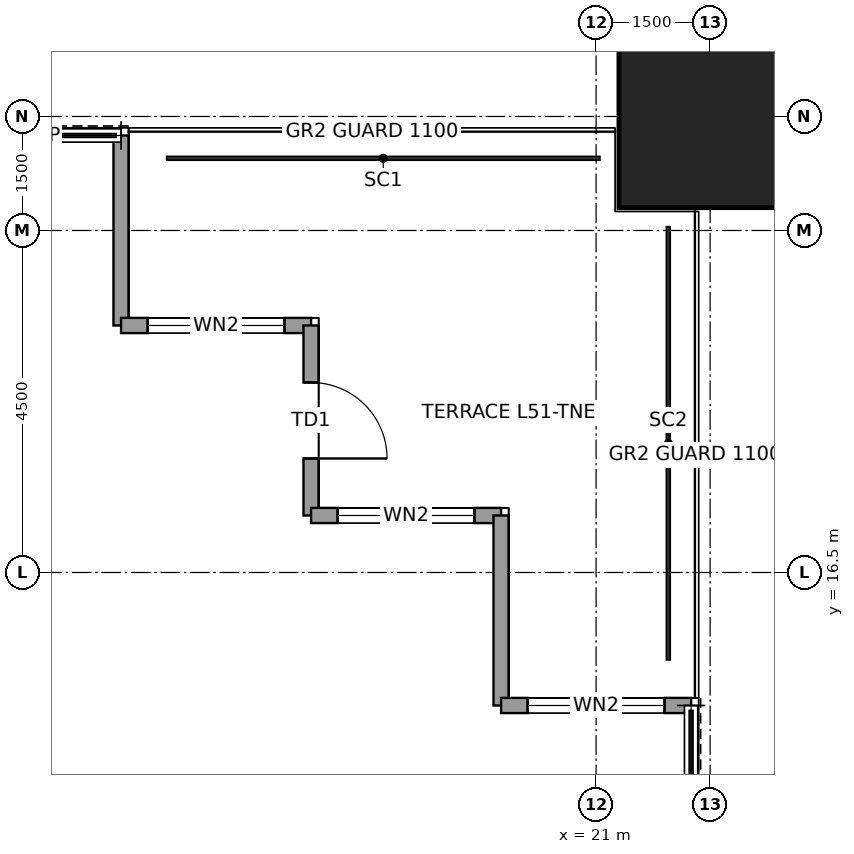
"""IFC4 building model, lengths in metres.
Left out: names, types, materials, properties, quantities, classifications, styles, units other than length and angle.
Written with IfcOpenShell. Run it as: python <this file> out.ifc"""

import sys

from ifc_helpers import new_model, si_unit, direction, frame, frame_2d, origin, origin_2d, place, context, subcontext, project, spatial, rectangle, hollow_rectangle, extrude, element, fill, save


model = new_model("IFC4")
c1 = context("Model", 3, precision=1e-05, world=origin(), true_north=direction((0.0, 1.0)))
c2 = subcontext(c1, "Body", "Model", "MODEL_VIEW")
j1 = project(units=[si_unit("LENGTHUNIT", "METRE"), si_unit("PLANEANGLEUNIT", "RADIAN")], contexts=[c1])
p1 = place(None, origin())
s1 = spatial("IfcSite", under=j1, at=p1, CompositionType="ELEMENT")
p2 = place(p1, origin())
s2 = spatial("IfcBuilding", under=s1, at=p2, CompositionType="ELEMENT")
p3 = place(p2, frame((0.0, 0.0, 237.9)))
s3 = spatial("IfcBuildingStorey", under=s2, at=p3, CompositionType="ELEMENT", Elevation=237.9)
p4 = place(p3, frame((22.5, 22.5, 0.0), z_axis=(0.0, 0.0, 1.0), x_axis=(1.0, 0.0, 0.0)))
e1 = element("IfcColumn", 1, at=p4, inside=s3, PredefinedType="COLUMN", context=c2, shape_type="SweptSolid", body=[
    extrude(hollow_rectangle(XDim=2.4, YDim=2.4, WallThickness=0.12, at=origin_2d()), origin(), (0.0, 0.0, 1.0), 4.0),
])
p5 = place(p3, frame((14.75, 22.25, 0.0), z_axis=(0.0, 0.0, 1.0), x_axis=(0.0, -1.0, 0.0)))
e2 = element("IfcWall", 2, at=p5, inside=s3, PredefinedType="SOLIDWALL", context=c2, shape_type="SweptSolid", body=[
    extrude(rectangle(XDim=2.5, YDim=0.2, at=frame_2d((1.25, 0.0))), origin(), (0.0, 0.0, 1.0), 3.85),
])
p6 = place(p3, frame((14.75, 19.75, 0.0), z_axis=(0.0, 0.0, 1.0), x_axis=(1.0, 0.0, 0.0)))
e3 = element("IfcWall", 3, at=p6, inside=s3, PredefinedType="SOLIDWALL", context=c2, shape_type="SweptSolid", body=[
    extrude(rectangle(XDim=2.5, YDim=0.2, at=frame_2d((1.25, 0.0))), origin(), (0.0, 0.0, 1.0), 3.85),
])
p7 = place(p6, frame((0.35, 0.0, 0.3)))
e4 = element("IfcOpeningElement", 4, at=p7, cuts=e3, PredefinedType="OPENING", context=c2, shape_type="SweptSolid", body=[
    extrude(rectangle(XDim=1.8, YDim=2.4, at=frame_2d((0.9, 1.2))), frame((0.0, 0.11, 0.0), z_axis=(0.0, -1.0, 0.0), x_axis=(1.0, 0.0, 0.0)), (0.0, 0.0, 1.0), 0.22),
])
p8 = place(p3, frame((17.25, 19.75, 0.0), z_axis=(0.0, 0.0, 1.0), x_axis=(0.0, -1.0, 0.0)))
e5 = element("IfcWall", 5, at=p8, inside=s3, PredefinedType="SOLIDWALL", context=c2, shape_type="SweptSolid", body=[
    extrude(rectangle(XDim=2.5, YDim=0.2, at=frame_2d((1.25, 0.0))), origin(), (0.0, 0.0, 1.0), 3.85),
])
p9 = place(p8, frame((0.75, 0.0, 0.0)))
e6 = element("IfcOpeningElement", 6, at=p9, cuts=e5, PredefinedType="OPENING", context=c2, shape_type="SweptSolid", body=[
    extrude(rectangle(XDim=1.0, YDim=2.4, at=frame_2d((0.5, 1.2))), frame((0.0, 0.11, 0.0), z_axis=(0.0, -1.0, 0.0), x_axis=(1.0, 0.0, 0.0)), (0.0, 0.0, 1.0), 0.22),
])
p10 = place(p3, frame((17.25, 17.25, 0.0), z_axis=(0.0, 0.0, 1.0), x_axis=(1.0, 0.0, 0.0)))
e7 = element("IfcWall", 7, at=p10, inside=s3, PredefinedType="SOLIDWALL", context=c2, shape_type="SweptSolid", body=[
    extrude(rectangle(XDim=2.5, YDim=0.2, at=frame_2d((1.25, 0.0))), origin(), (0.0, 0.0, 1.0), 3.85),
])
p11 = place(p10, frame((0.35, 0.0, 0.3)))
e8 = element("IfcOpeningElement", 8, at=p11, cuts=e7, PredefinedType="OPENING", context=c2, shape_type="SweptSolid", body=[
    extrude(rectangle(XDim=1.8, YDim=2.4, at=frame_2d((0.9, 1.2))), frame((0.0, 0.11, 0.0), z_axis=(0.0, -1.0, 0.0), x_axis=(1.0, 0.0, 0.0)), (0.0, 0.0, 1.0), 0.22),
])
p12 = place(p3, frame((19.75, 17.25, 0.0), z_axis=(0.0, 0.0, 1.0), x_axis=(0.0, -1.0, 0.0)))
e9 = element("IfcWall", 9, at=p12, inside=s3, PredefinedType="SOLIDWALL", context=c2, shape_type="SweptSolid", body=[
    extrude(rectangle(XDim=2.5, YDim=0.2, at=frame_2d((1.25, 0.0))), origin(), (0.0, 0.0, 1.0), 3.85),
])
p13 = place(p3, frame((19.75, 14.75, 0.0), z_axis=(0.0, 0.0, 1.0), x_axis=(1.0, 0.0, 0.0)))
e10 = element("IfcWall", 10, at=p13, inside=s3, PredefinedType="SOLIDWALL", context=c2, shape_type="SweptSolid", body=[
    extrude(rectangle(XDim=2.5, YDim=0.2, at=frame_2d((1.25, 0.0))), origin(), (0.0, 0.0, 1.0), 3.85),
])
p14 = place(p13, frame((0.35, 0.0, 0.3)))
e11 = element("IfcOpeningElement", 11, at=p14, cuts=e10, PredefinedType="OPENING", context=c2, shape_type="SweptSolid", body=[
    extrude(rectangle(XDim=1.8, YDim=2.4, at=frame_2d((0.9, 1.2))), frame((0.0, 0.11, 0.0), z_axis=(0.0, -1.0, 0.0), x_axis=(1.0, 0.0, 0.0)), (0.0, 0.0, 1.0), 0.22),
])
p15 = place(p7, origin())
e12 = element("IfcWindow", 12, at=p15, inside=s3, PartitioningType="SINGLE_PANEL", PredefinedType="WINDOW", context=c2, shape_type="SweptSolid", body=[
    extrude(rectangle(XDim=1.8, YDim=2.4, at=frame_2d((0.9, 1.2))), frame((0.0, 0.03, 0.0), z_axis=(0.0, -1.0, 0.0), x_axis=(1.0, 0.0, 0.0)), (0.0, 0.0, 1.0), 0.06),
])
fill(e4, e12)
p16 = place(p9, origin())
e13 = element("IfcDoor", 13, at=p16, inside=s3, OperationType="SINGLE_SWING_RIGHT", PredefinedType="DOOR", context=c2, shape_type="SweptSolid", body=[
    extrude(rectangle(XDim=1.0, YDim=2.4, at=frame_2d((0.5, 1.2))), frame((0.0, 0.025, 0.0), z_axis=(0.0, -1.0, 0.0), x_axis=(1.0, 0.0, 0.0)), (0.0, 0.0, 1.0), 0.05),
])
fill(e6, e13)
p17 = place(p11, origin())
e14 = element("IfcWindow", 14, at=p17, inside=s3, PartitioningType="SINGLE_PANEL", PredefinedType="WINDOW", context=c2, shape_type="SweptSolid", body=[
    extrude(rectangle(XDim=1.8, YDim=2.4, at=frame_2d((0.9, 1.2))), frame((0.0, 0.03, 0.0), z_axis=(0.0, -1.0, 0.0), x_axis=(1.0, 0.0, 0.0)), (0.0, 0.0, 1.0), 0.06),
])
fill(e8, e14)
p18 = place(p14, origin())
e15 = element("IfcWindow", 15, at=p18, inside=s3, PartitioningType="SINGLE_PANEL", PredefinedType="WINDOW", context=c2, shape_type="SweptSolid", body=[
    extrude(rectangle(XDim=1.8, YDim=2.4, at=frame_2d((0.9, 1.2))), frame((0.0, 0.03, 0.0), z_axis=(0.0, -1.0, 0.0), x_axis=(1.0, 0.0, 0.0)), (0.0, 0.0, 1.0), 0.06),
])
fill(e11, e15)
save(model, sys.argv[1])
